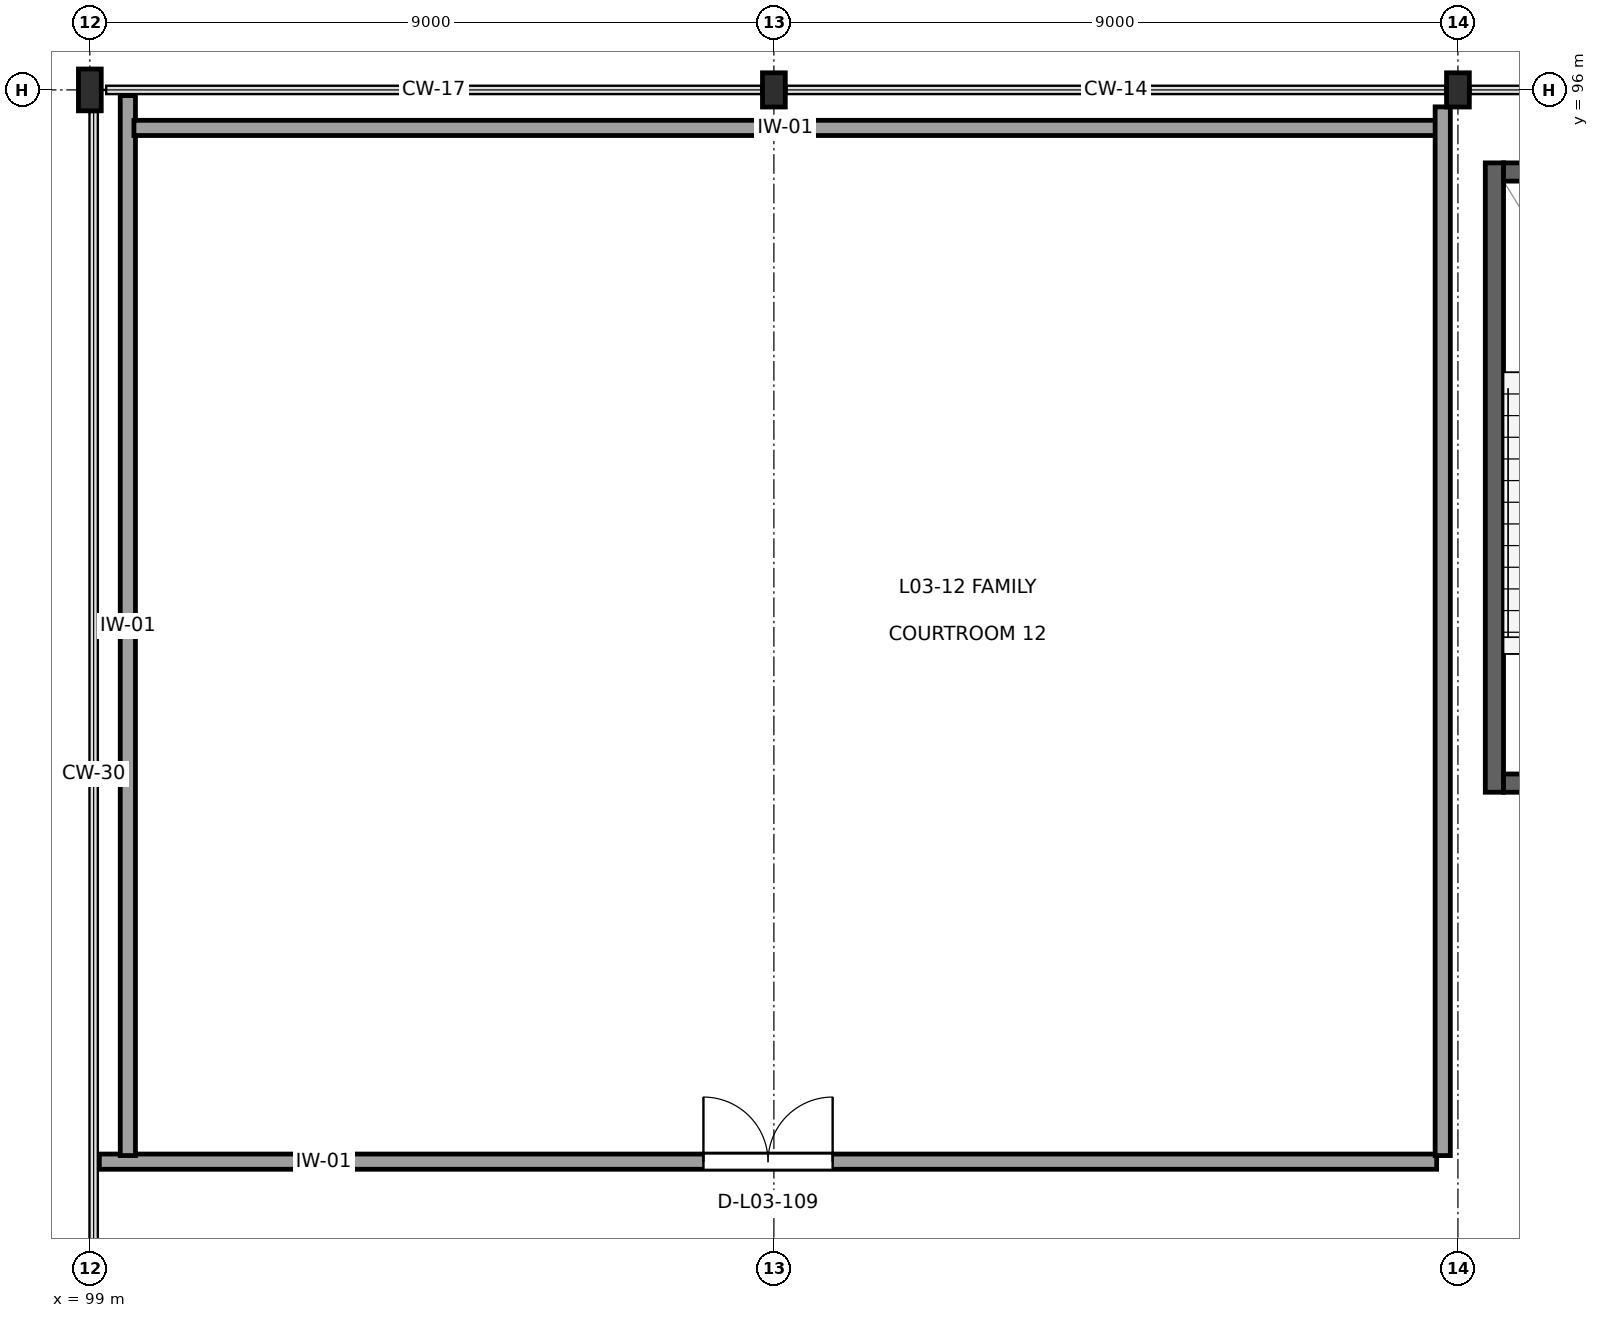
"""IFC4 building model, lengths in metres.
Left out: names, types, materials, properties, quantities, classifications, styles, units other than length and angle.
Written with IfcOpenShell. Run it as: python <this file> out.ifc"""

import sys

from ifc_helpers import new_model, si_unit, direction, frame, frame_2d, origin, origin_2d, place, context, subcontext, project, spatial, rectangle, i_section, extrude, element, fill, save


model = new_model("IFC4")
c1 = context("Model", 3, precision=1e-05, world=origin(), true_north=direction((0.0, 1.0)))
c2 = subcontext(c1, "Body", "Model", "MODEL_VIEW")
j1 = project(units=[si_unit("LENGTHUNIT", "METRE"), si_unit("PLANEANGLEUNIT", "RADIAN")], contexts=[c1])
p1 = place(None, origin())
s1 = spatial("IfcSite", under=j1, at=p1, CompositionType="ELEMENT")
p2 = place(p1, origin())
s2 = spatial("IfcBuilding", under=s1, at=p2, CompositionType="ELEMENT")
p3 = place(p2, frame((0.0, 0.0, 14.4)))
s3 = spatial("IfcBuildingStorey", under=s2, at=p3, CompositionType="ELEMENT", Elevation=14.4)
p4 = place(p3, frame((99.0, 96.0, 0.0), z_axis=(0.0, 0.0, 1.0), x_axis=(1.0, 0.0, 0.0)))
e1 = element("IfcColumn", 1, at=p4, inside=s3, PredefinedType="COLUMN", context=c2, shape_type="SweptSolid", body=[
    extrude(i_section(OverallWidth=0.3, OverallDepth=0.55, WebThickness=0.015, FlangeThickness=0.029, at=origin_2d()), origin(), (0.0, 0.0, 1.0), 4.5),
])
for number, where, z_axis, x_axis in (
    (2, (108.0, 96.0, 0.0), (0.0, 0.0, 1.0), (1.0, 0.0, 0.0)),
    (3, (117.0, 96.0, 0.0), (0.0, 0.0, 1.0), (1.0, 0.0, 0.0)),
):
    element("IfcColumn", number, at=place(p3, frame(where, z_axis=z_axis, x_axis=x_axis)), inside=s3, PredefinedType="COLUMN", context=c2, shape_type="SweptSolid", body=[
        extrude(i_section(OverallWidth=0.3, OverallDepth=0.45, WebThickness=0.014, FlangeThickness=0.026, at=origin_2d()), origin(), (0.0, 0.0, 1.0), 4.5),
    ])
p5 = place(p3, frame((117.48, 86.76, 0.0), z_axis=(0.0, 0.0, 1.0), x_axis=(0.0, 1.0, 0.0)))
e4 = element("IfcWall", 4, at=p5, inside=s3, PredefinedType="SHEAR", context=c2, shape_type="SweptSolid", body=[
    extrude(rectangle(XDim=8.28, YDim=0.24, at=frame_2d((4.14, 0.0))), origin(), (0.0, 0.0, 1.0), 4.31),
])
for number, where, z_axis, x_axis in (
    (5, (117.6, 86.88, 0.0), (0.0, 0.0, 1.0), (1.0, 0.0, 0.0)),
    (6, (117.6, 94.92, 0.0), (0.0, 0.0, 1.0), (1.0, 0.0, 0.0)),
):
    element("IfcWall", number, at=place(p3, frame(where, z_axis=z_axis, x_axis=x_axis)), inside=s3, PredefinedType="SHEAR", context=c2, shape_type="SweptSolid", body=[
        extrude(rectangle(XDim=3.7, YDim=0.24, at=frame_2d((1.85, 0.0))), origin(), (0.0, 0.0, 1.0), 4.31),
    ])
p6 = place(p3, frame((116.72, 81.9, 0.0), z_axis=(0.0, 0.0, 1.0), x_axis=(-1.0, 0.0, 0.0)))
e7 = element("IfcWall", 7, at=p6, inside=s3, PredefinedType="PARTITIONING", context=c2, shape_type="SweptSolid", body=[
    extrude(rectangle(XDim=17.595, YDim=0.2, at=frame_2d((8.797, 0.0))), origin(), (0.0, 0.0, 1.0), 4.14),
])
p7 = place(p6, frame((7.947, 0.0, 0.0)))
e8 = element("IfcOpeningElement", 8, at=p7, cuts=e7, PredefinedType="OPENING", context=c2, shape_type="SweptSolid", body=[
    extrude(rectangle(XDim=1.7, YDim=2.4, at=frame_2d((0.85, 1.2))), frame((0.0, 0.115, 0.0), z_axis=(0.0, -1.0, 0.0), x_axis=(1.0, 0.0, 0.0)), (0.0, 0.0, 1.0), 0.23),
])
p8 = place(p3, frame((99.5, 81.98, 0.0), z_axis=(0.0, 0.0, 1.0), x_axis=(0.0, 1.0, 0.0)))
e9 = element("IfcWall", 9, at=p8, inside=s3, PredefinedType="PARTITIONING", context=c2, shape_type="SweptSolid", body=[
    extrude(rectangle(XDim=13.945, YDim=0.2, at=frame_2d((6.973, 0.0))), origin(), (0.0, 0.0, 1.0), 4.14),
])
p9 = place(p3, frame((99.58, 95.5, 0.0), z_axis=(0.0, 0.0, 1.0), x_axis=(1.0, 0.0, 0.0)))
e10 = element("IfcWall", 10, at=p9, inside=s3, PredefinedType="PARTITIONING", context=c2, shape_type="SweptSolid", body=[
    extrude(rectangle(XDim=17.14, YDim=0.2, at=frame_2d((8.57, 0.0))), origin(), (0.0, 0.0, 1.0), 4.14),
])
p10 = place(p3, frame((116.8, 95.777, 0.0), z_axis=(0.0, 0.0, 1.0), x_axis=(0.0, -1.0, 0.0)))
e11 = element("IfcWall", 11, at=p10, inside=s3, PredefinedType="PARTITIONING", context=c2, shape_type="SweptSolid", body=[
    extrude(rectangle(XDim=13.797, YDim=0.2, at=frame_2d((6.898, 0.0))), origin(), (0.0, 0.0, 1.0), 3.505),
])
p11 = place(p7, frame((1.7, 0.0, 0.0), z_axis=(0.0, 0.0, 1.0), x_axis=(-1.0, 0.0, 0.0)))
e12 = element("IfcDoor", 12, at=p11, inside=s3, OperationType="DOUBLE_DOOR_SINGLE_SWING", PredefinedType="DOOR", context=c2, shape_type="SweptSolid", body=[
    extrude(rectangle(XDim=1.7, YDim=2.4, at=frame_2d((0.85, 1.2))), frame((0.0, 0.025, 0.0), z_axis=(0.0, -1.0, 0.0), x_axis=(1.0, 0.0, 0.0)), (0.0, 0.0, 1.0), 0.05),
])
fill(e8, e12)
save(model, sys.argv[1])
